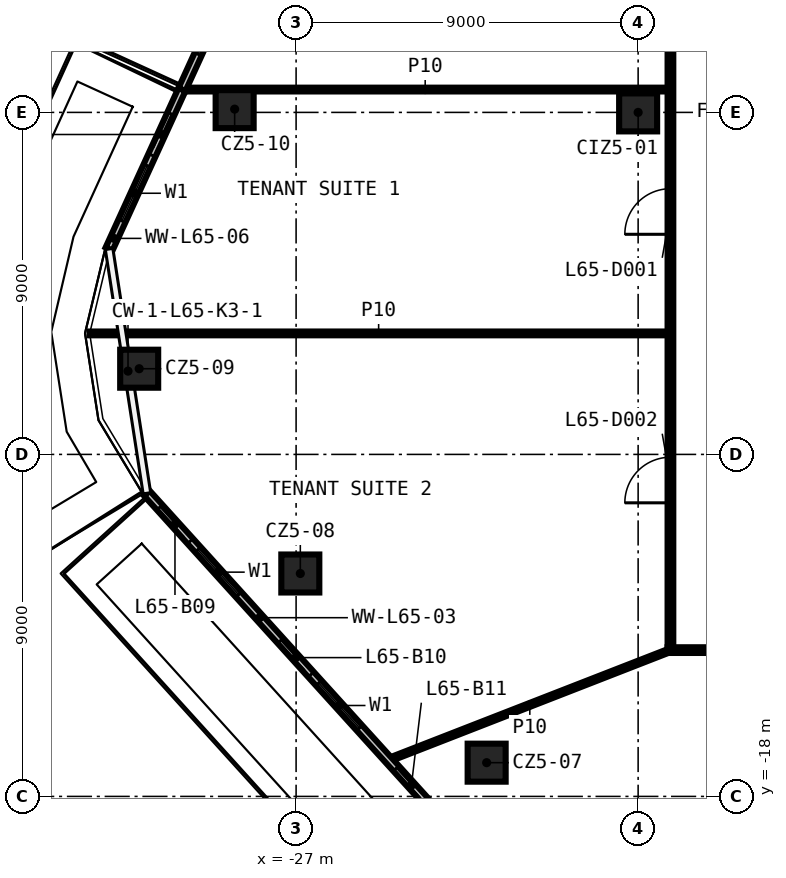
"""IFC4 building model, lengths in metres.
Left out: names, types, materials, properties, quantities, classifications, styles, units other than length and angle.
Written with IfcOpenShell. Run it as: python <this file> out.ifc"""

import sys

from ifc_helpers import new_model, si_unit, direction, frame, frame_2d, origin, origin_2d, place, context, subcontext, project, spatial, rectangle, extrude, element, fill, save


model = new_model("IFC4")
c1 = context("Model", 3, precision=1e-05, world=origin(), true_north=direction((0.0, 1.0)))
c2 = subcontext(c1, "Body", "Model", "MODEL_VIEW")
j1 = project(units=[si_unit("LENGTHUNIT", "METRE"), si_unit("PLANEANGLEUNIT", "RADIAN")], contexts=[c1])
p1 = place(None, origin())
s1 = spatial("IfcSite", under=j1, at=p1, CompositionType="ELEMENT")
p2 = place(p1, origin())
s2 = spatial("IfcBuilding", under=s1, at=p2, CompositionType="ELEMENT")
p3 = place(p2, frame((0.0, 0.0, 306.8)))
s3 = spatial("IfcBuildingStorey", under=s2, at=p3, CompositionType="ELEMENT", Elevation=306.8)
for number, where, z_axis, x_axis in (
    (1, (-21.986, -17.112, 0.0), (0.0, 0.0, 1.0), (1.0, 0.0, 0.0)),
    (2, (-26.889, -12.134, 0.0), (0.0, 0.0, 1.0), (1.0, 0.0, 0.0)),
    (3, (-31.129, -6.745, 0.0), (0.0, 0.0, 1.0), (1.0, 0.0, 0.0)),
    (4, (-28.617, 0.086, 0.0), (0.0, 0.0, 1.0), (1.0, 0.0, 0.0)),
    (5, (-18.0, 0.0, 0.0), (0.0, 0.0, 1.0), (1.0, 0.0, 0.0)),
):
    element("IfcColumn", number, at=place(p3, frame(where, z_axis=z_axis, x_axis=x_axis)), inside=s3, PredefinedType="COLUMN", context=c2, shape_type="SweptSolid", body=[
        extrude(rectangle(XDim=1.0, YDim=1.0, at=origin_2d()), origin(), (0.0, 0.0, 1.0), 3.82),
    ])
p4 = place(p3, frame((17.225, -14.15, 0.0), z_axis=(0.0, 0.0, 1.0), x_axis=(-1.0, 0.0, 0.0)))
e6 = element("IfcWall", 6, at=p4, inside=s3, PredefinedType="PARTITIONING", context=c2, shape_type="SweptSolid", body=[
    extrude(rectangle(XDim=34.45, YDim=0.15, at=frame_2d((17.225, 0.0))), origin(), (0.0, 0.0, 1.0), 3.82),
])
p5 = place(p4, frame((31.269, 0.0, 0.0)))
e7 = element("IfcOpeningElement", 7, at=p5, cuts=e6, PredefinedType="OPENING", context=c2, shape_type="SweptSolid", body=[
    extrude(rectangle(XDim=1.2, YDim=2.1, at=frame_2d((0.6, 1.05))), frame((0.0, 0.085, 0.0), z_axis=(0.0, -1.0, 0.0), x_axis=(1.0, 0.0, 0.0)), (0.0, 0.0, 1.0), 0.17),
])
p6 = place(p4, frame((24.719, 0.0, 0.0)))
e8 = element("IfcOpeningElement", 8, at=p6, cuts=e6, PredefinedType="OPENING", context=c2, shape_type="SweptSolid", body=[
    extrude(rectangle(XDim=1.2, YDim=2.1, at=frame_2d((0.6, 1.05))), frame((0.0, 0.085, 0.0), z_axis=(0.0, -1.0, 0.0), x_axis=(1.0, 0.0, 0.0)), (0.0, 0.0, 1.0), 0.17),
])
p7 = place(p4, frame((20.044, 0.0, 0.0)))
e9 = element("IfcOpeningElement", 9, at=p7, cuts=e6, PredefinedType="OPENING", context=c2, shape_type="SweptSolid", body=[
    extrude(rectangle(XDim=1.2, YDim=2.1, at=frame_2d((0.6, 1.05))), frame((0.0, 0.085, 0.0), z_axis=(0.0, -1.0, 0.0), x_axis=(1.0, 0.0, 0.0)), (0.0, 0.0, 1.0), 0.17),
])
p8 = place(p4, frame((15.364, 0.0, 0.0)))
e10 = element("IfcOpeningElement", 10, at=p8, cuts=e6, PredefinedType="OPENING", context=c2, shape_type="SweptSolid", body=[
    extrude(rectangle(XDim=1.2, YDim=2.1, at=frame_2d((0.6, 1.05))), frame((0.0, 0.085, 0.0), z_axis=(0.0, -1.0, 0.0), x_axis=(1.0, 0.0, 0.0)), (0.0, 0.0, 1.0), 0.17),
])
p9 = place(p4, frame((10.685, 0.0, 0.0)))
e11 = element("IfcOpeningElement", 11, at=p9, cuts=e6, PredefinedType="OPENING", context=c2, shape_type="SweptSolid", body=[
    extrude(rectangle(XDim=1.2, YDim=2.1, at=frame_2d((0.6, 1.05))), frame((0.0, 0.085, 0.0), z_axis=(0.0, -1.0, 0.0), x_axis=(1.0, 0.0, 0.0)), (0.0, 0.0, 1.0), 0.17),
])
p10 = place(p4, frame((4.107, 0.0, 0.0)))
e12 = element("IfcOpeningElement", 12, at=p10, cuts=e6, PredefinedType="OPENING", context=c2, shape_type="SweptSolid", body=[
    extrude(rectangle(XDim=1.2, YDim=2.1, at=frame_2d((0.6, 1.05))), frame((0.0, 0.085, 0.0), z_axis=(0.0, -1.0, 0.0), x_axis=(1.0, 0.0, 0.0)), (0.0, 0.0, 1.0), 0.17),
])
p11 = place(p3, frame((-32.431, -5.816, 0.0), z_axis=(0.0, 0.0, 1.0), x_axis=(1.0, 0.0, 0.0)))
e13 = element("IfcWall", 13, at=p11, inside=s3, PredefinedType="PARTITIONING", context=c2, shape_type="SweptSolid", body=[
    extrude(rectangle(XDim=15.206, YDim=0.1, at=frame_2d((7.603, 0.0))), origin(), (0.0, 0.0, 1.0), 3.82),
])
p12 = place(p3, frame((-29.981, 0.601, 0.0), z_axis=(0.0, 0.0, 1.0), x_axis=(1.0, 0.0, 0.0)))
e14 = element("IfcWall", 14, at=p12, inside=s3, PredefinedType="PARTITIONING", context=c2, shape_type="SweptSolid", body=[
    extrude(rectangle(XDim=12.756, YDim=0.1, at=frame_2d((6.378, 0.0))), origin(), (0.0, 0.0, 1.0), 3.82),
])
p13 = place(p3, frame((-24.55, -17.033, 0.0), z_axis=(0.0, 0.0, 1.0), x_axis=(0.931751191714, 0.363097392911, 0.0)))
e15 = element("IfcWall", 15, at=p13, inside=s3, PredefinedType="PARTITIONING", context=c2, shape_type="SweptSolid", body=[
    extrude(rectangle(XDim=7.942, YDim=0.1, at=frame_2d((3.971, 0.0))), origin(), (0.0, 0.0, 1.0), 3.82),
])
p14 = place(p3, frame((-17.15, -14.075, 0.0), z_axis=(0.0, 0.0, 1.0), x_axis=(0.0, 1.0, 0.0)))
e16 = element("IfcWall", 16, at=p14, inside=s3, PredefinedType="PARTITIONING", context=c2, shape_type="SweptSolid", body=[
    extrude(rectangle(XDim=28.15, YDim=0.15, at=frame_2d((14.075, 0.0))), origin(), (0.0, 0.0, 1.0), 3.82),
])
p15 = place(p14, frame((10.867, 0.0, 0.0)))
e17 = element("IfcOpeningElement", 17, at=p15, cuts=e16, PredefinedType="OPENING", context=c2, shape_type="SweptSolid", body=[
    extrude(rectangle(XDim=1.2, YDim=2.1, at=frame_2d((0.6, 1.05))), frame((0.0, 0.085, 0.0), z_axis=(0.0, -1.0, 0.0), x_axis=(1.0, 0.0, 0.0)), (0.0, 0.0, 1.0), 0.17),
])
p16 = place(p14, frame((3.801, 0.0, 0.0)))
e18 = element("IfcOpeningElement", 18, at=p16, cuts=e16, PredefinedType="OPENING", context=c2, shape_type="SweptSolid", body=[
    extrude(rectangle(XDim=1.2, YDim=2.1, at=frame_2d((0.6, 1.05))), frame((0.0, 0.085, 0.0), z_axis=(0.0, -1.0, 0.0), x_axis=(1.0, 0.0, 0.0)), (0.0, 0.0, 1.0), 0.17),
])
p17 = place(p14, frame((18.279, 0.0, 0.0)))
e19 = element("IfcOpeningElement", 19, at=p17, cuts=e16, PredefinedType="OPENING", context=c2, shape_type="SweptSolid", body=[
    extrude(rectangle(XDim=1.2, YDim=2.1, at=frame_2d((0.6, 1.05))), frame((0.0, 0.085, 0.0), z_axis=(0.0, -1.0, 0.0), x_axis=(1.0, 0.0, 0.0)), (0.0, 0.0, 1.0), 0.17),
])
p18 = place(p3, frame((-22.318, 17.414, 0.0), z_axis=(0.0, 0.0, 1.0), x_axis=(-0.415710447513, -0.909497016943, 0.0)))
e20 = element("IfcWall", 20, at=p18, inside=s3, PredefinedType="SOLIDWALL", context=c2, shape_type="SweptSolid", body=[
    extrude(rectangle(XDim=18.487, YDim=0.2, at=frame_2d((9.243, 0.0))), origin(), (0.0, 0.0, 1.0), 3.82),
])
p19 = place(p18, frame((2.0, 0.0, 0.6)))
e21 = element("IfcOpeningElement", 21, at=p19, cuts=e20, PredefinedType="OPENING", context=c2, shape_type="SweptSolid", body=[
    extrude(rectangle(XDim=1.6, YDim=2.4, at=frame_2d((0.8, 1.2))), frame((0.0, 0.11, 0.0), z_axis=(0.0, -1.0, 0.0), x_axis=(1.0, 0.0, 0.0)), (0.0, 0.0, 1.0), 0.22),
])
p20 = place(p18, frame((0.5, 0.0, 0.0)))
e22 = element("IfcOpeningElement", 22, at=p20, cuts=e20, PredefinedType="OPENING", context=c2, shape_type="SweptSolid", body=[
    extrude(rectangle(XDim=1.2, YDim=2.4, at=frame_2d((0.6, 1.2))), frame((0.0, 0.11, 0.0), z_axis=(0.0, -1.0, 0.0), x_axis=(1.0, 0.0, 0.0)), (0.0, 0.0, 1.0), 0.22),
])
p21 = place(p18, frame((6.622, 0.0, 0.6)))
e23 = element("IfcOpeningElement", 23, at=p21, cuts=e20, PredefinedType="OPENING", context=c2, shape_type="SweptSolid", body=[
    extrude(rectangle(XDim=1.6, YDim=2.4, at=frame_2d((0.8, 1.2))), frame((0.0, 0.11, 0.0), z_axis=(0.0, -1.0, 0.0), x_axis=(1.0, 0.0, 0.0)), (0.0, 0.0, 1.0), 0.22),
])
p22 = place(p18, frame((5.122, 0.0, 0.0)))
e24 = element("IfcOpeningElement", 24, at=p22, cuts=e20, PredefinedType="OPENING", context=c2, shape_type="SweptSolid", body=[
    extrude(rectangle(XDim=1.2, YDim=2.4, at=frame_2d((0.6, 1.2))), frame((0.0, 0.11, 0.0), z_axis=(0.0, -1.0, 0.0), x_axis=(1.0, 0.0, 0.0)), (0.0, 0.0, 1.0), 0.22),
])
p23 = place(p18, frame((9.743, 0.0, 0.6)))
e25 = element("IfcOpeningElement", 25, at=p23, cuts=e20, PredefinedType="OPENING", context=c2, shape_type="SweptSolid", body=[
    extrude(rectangle(XDim=1.6, YDim=2.4, at=frame_2d((0.8, 1.2))), frame((0.0, 0.11, 0.0), z_axis=(0.0, -1.0, 0.0), x_axis=(1.0, 0.0, 0.0)), (0.0, 0.0, 1.0), 0.22),
])
p24 = place(p18, frame((11.643, 0.0, 0.0)))
e26 = element("IfcOpeningElement", 26, at=p24, cuts=e20, PredefinedType="OPENING", context=c2, shape_type="SweptSolid", body=[
    extrude(rectangle(XDim=1.2, YDim=2.4, at=frame_2d((0.6, 1.2))), frame((0.0, 0.11, 0.0), z_axis=(0.0, -1.0, 0.0), x_axis=(1.0, 0.0, 0.0)), (0.0, 0.0, 1.0), 0.22),
])
p25 = place(p18, frame((15.865, 0.0, 0.6)))
e27 = element("IfcOpeningElement", 27, at=p25, cuts=e20, PredefinedType="OPENING", context=c2, shape_type="SweptSolid", body=[
    extrude(rectangle(XDim=1.6, YDim=2.4, at=frame_2d((0.8, 1.2))), frame((0.0, 0.11, 0.0), z_axis=(0.0, -1.0, 0.0), x_axis=(1.0, 0.0, 0.0)), (0.0, 0.0, 1.0), 0.22),
])
p26 = place(p18, frame((14.365, 0.0, 0.0)))
e28 = element("IfcOpeningElement", 28, at=p26, cuts=e20, PredefinedType="OPENING", context=c2, shape_type="SweptSolid", body=[
    extrude(rectangle(XDim=1.2, YDim=2.4, at=frame_2d((0.6, 1.2))), frame((0.0, 0.11, 0.0), z_axis=(0.0, -1.0, 0.0), x_axis=(1.0, 0.0, 0.0)), (0.0, 0.0, 1.0), 0.22),
])
p27 = place(p3, frame((-30.003, 0.601, 0.0), z_axis=(0.0, 0.0, 1.0), x_axis=(-0.415728482872, -0.909488773174, 0.0)))
e29 = element("IfcWall", 29, at=p27, inside=s3, PredefinedType="SOLIDWALL", context=c2, shape_type="SweptSolid", body=[
    extrude(rectangle(XDim=4.612, YDim=0.2, at=frame_2d((2.306, 0.0))), origin(), (0.0, 0.0, 1.0), 3.82),
])
p28 = place(p27, frame((2.2, 0.0, 0.6)))
e30 = element("IfcOpeningElement", 30, at=p28, cuts=e29, PredefinedType="OPENING", context=c2, shape_type="SweptSolid", body=[
    extrude(rectangle(XDim=1.6, YDim=2.4, at=frame_2d((0.8, 1.2))), frame((0.0, 0.11, 0.0), z_axis=(0.0, -1.0, 0.0), x_axis=(1.0, 0.0, 0.0)), (0.0, 0.0, 1.0), 0.22),
])
p29 = place(p27, frame((0.7, 0.0, 0.0)))
e31 = element("IfcOpeningElement", 31, at=p29, cuts=e29, PredefinedType="OPENING", context=c2, shape_type="SweptSolid", body=[
    extrude(rectangle(XDim=1.2, YDim=2.4, at=frame_2d((0.6, 1.2))), frame((0.0, 0.11, 0.0), z_axis=(0.0, -1.0, 0.0), x_axis=(1.0, 0.0, 0.0)), (0.0, 0.0, 1.0), 0.22),
])
p30 = place(p3, frame((-30.926, -10.023, 0.0), z_axis=(0.0, 0.0, 1.0), x_axis=(0.671222052588, -0.74125633631, 0.0)))
e32 = element("IfcWall", 32, at=p30, inside=s3, PredefinedType="SOLIDWALL", context=c2, shape_type="SweptSolid", body=[
    extrude(rectangle(XDim=14.202, YDim=0.2, at=frame_2d((7.101, 0.0))), origin(), (0.0, 0.0, 1.0), 3.82),
])
p31 = place(p30, frame((2.0, 0.0, 0.6)))
e33 = element("IfcOpeningElement", 33, at=p31, cuts=e32, PredefinedType="OPENING", context=c2, shape_type="SweptSolid", body=[
    extrude(rectangle(XDim=1.6, YDim=2.4, at=frame_2d((0.8, 1.2))), frame((0.0, 0.11, 0.0), z_axis=(0.0, -1.0, 0.0), x_axis=(1.0, 0.0, 0.0)), (0.0, 0.0, 1.0), 0.22),
])
p32 = place(p30, frame((0.5, 0.0, 0.0)))
e34 = element("IfcOpeningElement", 34, at=p32, cuts=e32, PredefinedType="OPENING", context=c2, shape_type="SweptSolid", body=[
    extrude(rectangle(XDim=1.2, YDim=2.4, at=frame_2d((0.6, 1.2))), frame((0.0, 0.11, 0.0), z_axis=(0.0, -1.0, 0.0), x_axis=(1.0, 0.0, 0.0)), (0.0, 0.0, 1.0), 0.22),
])
p33 = place(p30, frame((6.734, 0.0, 0.6)))
e35 = element("IfcOpeningElement", 35, at=p33, cuts=e32, PredefinedType="OPENING", context=c2, shape_type="SweptSolid", body=[
    extrude(rectangle(XDim=1.6, YDim=2.4, at=frame_2d((0.8, 1.2))), frame((0.0, 0.11, 0.0), z_axis=(0.0, -1.0, 0.0), x_axis=(1.0, 0.0, 0.0)), (0.0, 0.0, 1.0), 0.22),
])
p34 = place(p30, frame((5.234, 0.0, 0.0)))
e36 = element("IfcOpeningElement", 36, at=p34, cuts=e32, PredefinedType="OPENING", context=c2, shape_type="SweptSolid", body=[
    extrude(rectangle(XDim=1.2, YDim=2.4, at=frame_2d((0.6, 1.2))), frame((0.0, 0.11, 0.0), z_axis=(0.0, -1.0, 0.0), x_axis=(1.0, 0.0, 0.0)), (0.0, 0.0, 1.0), 0.22),
])
p35 = place(p30, frame((11.468, 0.0, 0.6)))
e37 = element("IfcOpeningElement", 37, at=p35, cuts=e32, PredefinedType="OPENING", context=c2, shape_type="SweptSolid", body=[
    extrude(rectangle(XDim=1.6, YDim=2.4, at=frame_2d((0.8, 1.2))), frame((0.0, 0.11, 0.0), z_axis=(0.0, -1.0, 0.0), x_axis=(1.0, 0.0, 0.0)), (0.0, 0.0, 1.0), 0.22),
])
p36 = place(p30, frame((9.768, 0.0, 0.0)))
e38 = element("IfcOpeningElement", 38, at=p36, cuts=e32, PredefinedType="OPENING", context=c2, shape_type="SweptSolid", body=[
    extrude(rectangle(XDim=1.2, YDim=2.4, at=frame_2d((0.6, 1.2))), frame((0.0, 0.11, 0.0), z_axis=(0.0, -1.0, 0.0), x_axis=(1.0, 0.0, 0.0)), (0.0, 0.0, 1.0), 0.22),
])
p37 = place(p15, origin())
e39 = element("IfcDoor", 39, at=p37, inside=s3, OperationType="SINGLE_SWING_RIGHT", PredefinedType="DOOR", context=c2, shape_type="SweptSolid", body=[
    extrude(rectangle(XDim=1.2, YDim=2.1, at=frame_2d((0.6, 1.05))), frame((0.0, 0.025, 0.0), z_axis=(0.0, -1.0, 0.0), x_axis=(1.0, 0.0, 0.0)), (0.0, 0.0, 1.0), 0.05),
])
fill(e17, e39)
p38 = place(p16, origin())
e40 = element("IfcDoor", 40, at=p38, inside=s3, OperationType="SINGLE_SWING_LEFT", PredefinedType="DOOR", context=c2, shape_type="SweptSolid", body=[
    extrude(rectangle(XDim=1.2, YDim=2.1, at=frame_2d((0.6, 1.05))), frame((0.0, 0.025, 0.0), z_axis=(0.0, -1.0, 0.0), x_axis=(1.0, 0.0, 0.0)), (0.0, 0.0, 1.0), 0.05),
])
fill(e18, e40)
p39 = place(p25, origin())
e41 = element("IfcWindow", 41, at=p39, inside=s3, PartitioningType="SINGLE_PANEL", PredefinedType="WINDOW", context=c2, shape_type="SweptSolid", body=[
    extrude(rectangle(XDim=1.6, YDim=2.4, at=frame_2d((0.8, 1.2))), frame((0.0, 0.03, 0.0), z_axis=(0.0, -1.0, 0.0), x_axis=(1.0, 0.0, 0.0)), (0.0, 0.0, 1.0), 0.06),
])
fill(e27, e41)
p40 = place(p28, origin())
e42 = element("IfcWindow", 42, at=p40, inside=s3, PartitioningType="SINGLE_PANEL", PredefinedType="WINDOW", context=c2, shape_type="SweptSolid", body=[
    extrude(rectangle(XDim=1.6, YDim=2.4, at=frame_2d((0.8, 1.2))), frame((0.0, 0.03, 0.0), z_axis=(0.0, -1.0, 0.0), x_axis=(1.0, 0.0, 0.0)), (0.0, 0.0, 1.0), 0.06),
])
fill(e30, e42)
p41 = place(p29, origin())
e43 = element("IfcDoor", 43, at=p41, inside=s3, OperationType="SLIDING_TO_LEFT", PredefinedType="DOOR", context=c2, shape_type="SweptSolid", body=[
    extrude(rectangle(XDim=1.2, YDim=2.4, at=frame_2d((0.6, 1.2))), frame((0.0, 0.025, 0.0), z_axis=(0.0, -1.0, 0.0), x_axis=(1.0, 0.0, 0.0)), (0.0, 0.0, 1.0), 0.05),
])
fill(e31, e43)
p42 = place(p31, origin())
e44 = element("IfcWindow", 44, at=p42, inside=s3, PartitioningType="SINGLE_PANEL", PredefinedType="WINDOW", context=c2, shape_type="SweptSolid", body=[
    extrude(rectangle(XDim=1.6, YDim=2.4, at=frame_2d((0.8, 1.2))), frame((0.0, 0.03, 0.0), z_axis=(0.0, -1.0, 0.0), x_axis=(1.0, 0.0, 0.0)), (0.0, 0.0, 1.0), 0.06),
])
fill(e33, e44)
p43 = place(p32, origin())
e45 = element("IfcDoor", 45, at=p43, inside=s3, OperationType="SLIDING_TO_LEFT", PredefinedType="DOOR", context=c2, shape_type="SweptSolid", body=[
    extrude(rectangle(XDim=1.2, YDim=2.4, at=frame_2d((0.6, 1.2))), frame((0.0, 0.025, 0.0), z_axis=(0.0, -1.0, 0.0), x_axis=(1.0, 0.0, 0.0)), (0.0, 0.0, 1.0), 0.05),
])
fill(e34, e45)
p44 = place(p33, origin())
e46 = element("IfcWindow", 46, at=p44, inside=s3, PartitioningType="SINGLE_PANEL", PredefinedType="WINDOW", context=c2, shape_type="SweptSolid", body=[
    extrude(rectangle(XDim=1.6, YDim=2.4, at=frame_2d((0.8, 1.2))), frame((0.0, 0.03, 0.0), z_axis=(0.0, -1.0, 0.0), x_axis=(1.0, 0.0, 0.0)), (0.0, 0.0, 1.0), 0.06),
])
fill(e35, e46)
p45 = place(p34, origin())
e47 = element("IfcDoor", 47, at=p45, inside=s3, OperationType="SLIDING_TO_LEFT", PredefinedType="DOOR", context=c2, shape_type="SweptSolid", body=[
    extrude(rectangle(XDim=1.2, YDim=2.4, at=frame_2d((0.6, 1.2))), frame((0.0, 0.025, 0.0), z_axis=(0.0, -1.0, 0.0), x_axis=(1.0, 0.0, 0.0)), (0.0, 0.0, 1.0), 0.05),
])
fill(e36, e47)
p46 = place(p36, origin())
e48 = element("IfcDoor", 48, at=p46, inside=s3, OperationType="SLIDING_TO_LEFT", PredefinedType="DOOR", context=c2, shape_type="SweptSolid", body=[
    extrude(rectangle(XDim=1.2, YDim=2.4, at=frame_2d((0.6, 1.2))), frame((0.0, 0.025, 0.0), z_axis=(0.0, -1.0, 0.0), x_axis=(1.0, 0.0, 0.0)), (0.0, 0.0, 1.0), 0.05),
])
fill(e38, e48)
save(model, sys.argv[1])
